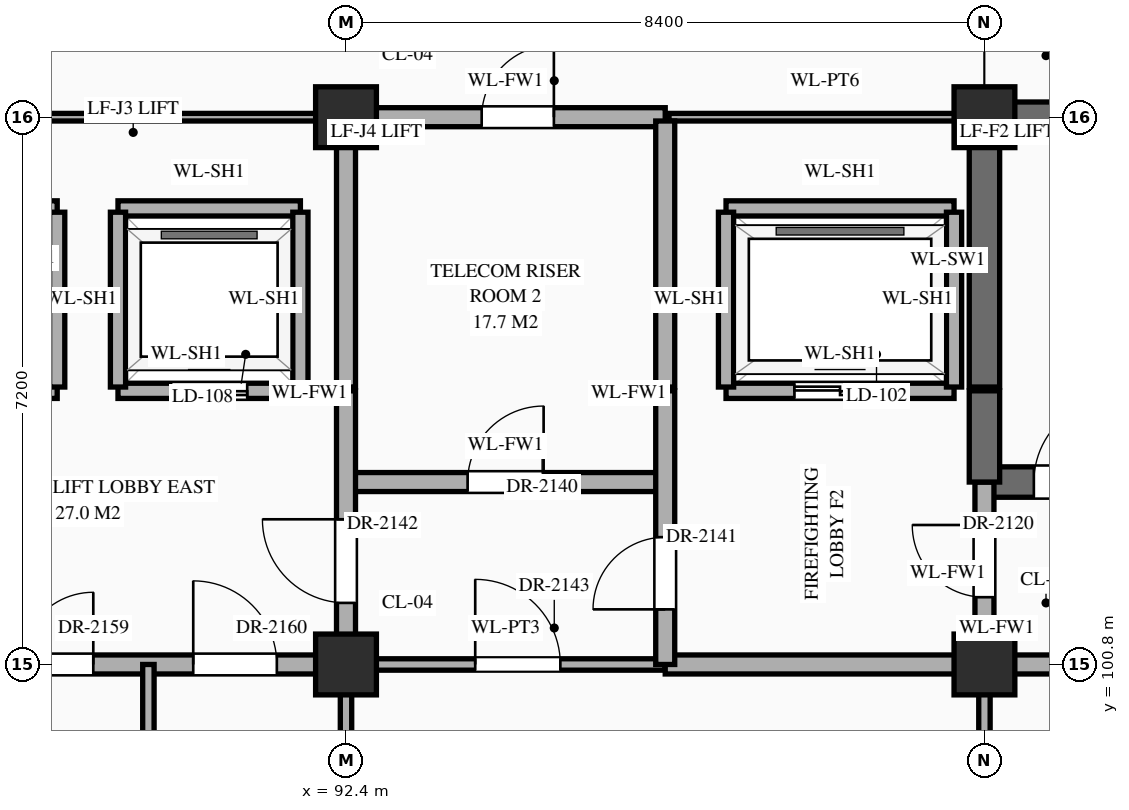
"""IFC4 building model, lengths in metres.
Left out: names, types, materials, properties, quantities, classifications, styles, units other than length and angle.
Written with IfcOpenShell. Run it as: python <this file> out.ifc"""

import sys

from ifc_helpers import new_model, si_unit, direction, frame, frame_2d, origin, origin_2d, place, context, subcontext, project, spatial, rectangle, extrude, element, fill, save


model = new_model("IFC4")
c1 = context("Model", 3, precision=1e-05, world=origin(), true_north=direction((0.0, 1.0)))
c2 = subcontext(c1, "Body", "Model", "MODEL_VIEW")
j1 = project(units=[si_unit("LENGTHUNIT", "METRE"), si_unit("PLANEANGLEUNIT", "RADIAN")], contexts=[c1])
p1 = place(None, origin())
s1 = spatial("IfcSite", under=j1, at=p1, CompositionType="ELEMENT")
p2 = place(p1, origin())
s2 = spatial("IfcBuilding", under=s1, at=p2, CompositionType="ELEMENT")
p3 = place(p2, frame((0.0, 0.0, 26.1)))
s3 = spatial("IfcBuildingStorey", under=s2, at=p3, CompositionType="ELEMENT", Elevation=26.1)
for number, where, z_axis, x_axis in (
    (1, (92.4, 100.8, 0.0), (0.0, 0.0, 1.0), (1.0, 0.0, 0.0)),
    (2, (92.4, 108.0, 0.0), (0.0, 0.0, 1.0), (1.0, 0.0, 0.0)),
    (3, (100.8, 100.8, 0.0), (0.0, 0.0, 1.0), (1.0, 0.0, 0.0)),
    (4, (100.8, 108.0, 0.0), (0.0, 0.0, 1.0), (1.0, 0.0, 0.0)),
):
    element("IfcColumn", number, at=place(p3, frame(where, z_axis=z_axis, x_axis=x_axis)), inside=s3, PredefinedType="COLUMN", context=c2, shape_type="SweptSolid", body=[
        extrude(rectangle(XDim=0.8, YDim=0.8, at=origin_2d()), origin(), (0.0, 0.0, 1.0), 4.5),
    ])
p4 = place(p3, frame((75.6, 100.8, 0.0), z_axis=(0.0, 0.0, 1.0), x_axis=(1.0, 0.0, 0.0)))
e5 = element("IfcWall", 5, at=p4, inside=s3, PredefinedType="STANDARD", context=c2, shape_type="SweptSolid", body=[
    extrude(rectangle(XDim=16.8, YDim=0.25, at=frame_2d((8.4, 0.0))), origin(), (0.0, 0.0, 1.0), 3.39),
])
p5 = place(p4, frame((3.725, 0.0, 0.0)))
e6 = element("IfcOpeningElement", 6, at=p5, cuts=e5, PredefinedType="OPENING", context=c2, shape_type="SweptSolid", body=[
    extrude(rectangle(XDim=0.95, YDim=2.15, at=frame_2d((0.475, 1.075))), frame((0.0, 0.137, 0.0), z_axis=(0.0, -1.0, 0.0), x_axis=(1.0, 0.0, 0.0)), (0.0, 0.0, 1.0), 0.274),
])
p6 = place(p4, frame((9.76, 0.0, 0.0)))
e7 = element("IfcOpeningElement", 7, at=p6, cuts=e5, PredefinedType="OPENING", context=c2, shape_type="SweptSolid", body=[
    extrude(rectangle(XDim=1.0, YDim=2.2, at=frame_2d((0.5, 1.1))), frame((0.0, 0.137, 0.0), z_axis=(0.0, -1.0, 0.0), x_axis=(1.0, 0.0, 0.0)), (0.0, 0.0, 1.0), 0.274),
])
p7 = place(p4, frame((12.525, 0.0, 0.0)))
e8 = element("IfcOpeningElement", 8, at=p7, cuts=e5, PredefinedType="OPENING", context=c2, shape_type="SweptSolid", body=[
    extrude(rectangle(XDim=0.95, YDim=2.15, at=frame_2d((0.475, 1.075))), frame((0.0, 0.137, 0.0), z_axis=(0.0, -1.0, 0.0), x_axis=(1.0, 0.0, 0.0)), (0.0, 0.0, 1.0), 0.274),
])
p8 = place(p4, frame((14.79, 0.0, 0.0)))
e9 = element("IfcOpeningElement", 9, at=p8, cuts=e5, PredefinedType="OPENING", context=c2, shape_type="SweptSolid", body=[
    extrude(rectangle(XDim=1.1, YDim=2.2, at=frame_2d((0.55, 1.1))), frame((0.0, 0.137, 0.0), z_axis=(0.0, -1.0, 0.0), x_axis=(1.0, 0.0, 0.0)), (0.0, 0.0, 1.0), 0.274),
])
p9 = place(p3, frame((92.4, 100.8, 0.0), z_axis=(0.0, 0.0, 1.0), x_axis=(1.0, 0.0, 0.0)))
e10 = element("IfcWall", 10, at=p9, inside=s3, PredefinedType="STANDARD", context=c2, shape_type="SweptSolid", body=[
    extrude(rectangle(XDim=4.2, YDim=0.15, at=frame_2d((2.1, 0.0))), origin(), (0.0, 0.0, 1.0), 3.39),
])
p10 = place(p9, frame((1.7, 0.0, 0.0)))
e11 = element("IfcOpeningElement", 11, at=p10, cuts=e10, PredefinedType="OPENING", context=c2, shape_type="SweptSolid", body=[
    extrude(rectangle(XDim=1.12, YDim=2.25, at=frame_2d((0.56, 1.125))), frame((0.0, 0.087, 0.0), z_axis=(0.0, -1.0, 0.0), x_axis=(1.0, 0.0, 0.0)), (0.0, 0.0, 1.0), 0.174),
])
p11 = place(p3, frame((96.6, 100.8, 0.0), z_axis=(0.0, 0.0, 1.0), x_axis=(1.0, 0.0, 0.0)))
e12 = element("IfcWall", 12, at=p11, inside=s3, PredefinedType="STANDARD", context=c2, shape_type="SweptSolid", body=[
    extrude(rectangle(XDim=12.6, YDim=0.25, at=frame_2d((6.3, 0.0))), origin(), (0.0, 0.0, 1.0), 3.39),
])
p12 = place(p11, frame((7.9, 0.0, 0.0)))
e13 = element("IfcOpeningElement", 13, at=p12, cuts=e12, PredefinedType="OPENING", context=c2, shape_type="SweptSolid", body=[
    extrude(rectangle(XDim=1.0, YDim=2.2, at=frame_2d((0.5, 1.1))), frame((0.0, 0.137, 0.0), z_axis=(0.0, -1.0, 0.0), x_axis=(1.0, 0.0, 0.0)), (0.0, 0.0, 1.0), 0.274),
])
p13 = place(p3, frame((92.4, 103.2, 0.0), z_axis=(0.0, 0.0, 1.0), x_axis=(1.0, 0.0, 0.0)))
e14 = element("IfcWall", 14, at=p13, inside=s3, PredefinedType="STANDARD", context=c2, shape_type="SweptSolid", body=[
    extrude(rectangle(XDim=4.2, YDim=0.25, at=frame_2d((2.1, 0.0))), origin(), (0.0, 0.0, 1.0), 4.24),
])
p14 = place(p13, frame((1.6, 0.0, 0.0)))
e15 = element("IfcOpeningElement", 15, at=p14, cuts=e14, PredefinedType="OPENING", context=c2, shape_type="SweptSolid", body=[
    extrude(rectangle(XDim=1.0, YDim=2.2, at=frame_2d((0.5, 1.1))), frame((0.0, 0.137, 0.0), z_axis=(0.0, -1.0, 0.0), x_axis=(1.0, 0.0, 0.0)), (0.0, 0.0, 1.0), 0.274),
])
p15 = place(p3, frame((100.8, 103.2, 0.0), z_axis=(0.0, 0.0, 1.0), x_axis=(1.0, 0.0, 0.0)))
e16 = element("IfcWall", 16, at=p15, inside=s3, PredefinedType="SHEAR", context=c2, shape_type="SweptSolid", body=[
    extrude(rectangle(XDim=8.4, YDim=0.4, at=frame_2d((4.2, 0.0))), origin(), (0.0, 0.0, 1.0), 4.24),
])
p16 = place(p15, frame((0.65, 0.0, 0.0)))
e17 = element("IfcOpeningElement", 17, at=p16, cuts=e16, PredefinedType="OPENING", context=c2, shape_type="SweptSolid", body=[
    extrude(rectangle(XDim=1.1, YDim=2.2, at=frame_2d((0.55, 1.1))), frame((0.0, 0.212, 0.0), z_axis=(0.0, -1.0, 0.0), x_axis=(1.0, 0.0, 0.0)), (0.0, 0.0, 1.0), 0.424),
])
p17 = place(p3, frame((86.2, 104.4, 0.0), z_axis=(0.0, 0.0, 1.0), x_axis=(1.0, 0.0, 0.0)))
e18 = element("IfcWall", 18, at=p17, inside=s3, PredefinedType="STANDARD", context=c2, shape_type="SweptSolid", body=[
    extrude(rectangle(XDim=2.4, YDim=0.2, at=frame_2d((1.2, 0.0))), origin(), (0.0, 0.0, 1.0), 4.24),
])
p18 = place(p17, frame((0.7, 0.0, 0.0)))
e19 = element("IfcOpeningElement", 19, at=p18, cuts=e18, PredefinedType="OPENING", context=c2, shape_type="SweptSolid", body=[
    extrude(rectangle(XDim=1.0, YDim=2.15, at=frame_2d((0.5, 1.075))), frame((0.0, 0.112, 0.0), z_axis=(0.0, -1.0, 0.0), x_axis=(1.0, 0.0, 0.0)), (0.0, 0.0, 1.0), 0.224),
])
p19 = place(p3, frame((89.4, 104.4, 0.0), z_axis=(0.0, 0.0, 1.0), x_axis=(1.0, 0.0, 0.0)))
e20 = element("IfcWall", 20, at=p19, inside=s3, PredefinedType="STANDARD", context=c2, shape_type="SweptSolid", body=[
    extrude(rectangle(XDim=2.4, YDim=0.2, at=frame_2d((1.2, 0.0))), origin(), (0.0, 0.0, 1.0), 4.24),
])
p20 = place(p19, frame((0.7, 0.0, 0.0)))
e21 = element("IfcOpeningElement", 21, at=p20, cuts=e20, PredefinedType="OPENING", context=c2, shape_type="SweptSolid", body=[
    extrude(rectangle(XDim=1.0, YDim=2.15, at=frame_2d((0.5, 1.075))), frame((0.0, 0.112, 0.0), z_axis=(0.0, -1.0, 0.0), x_axis=(1.0, 0.0, 0.0)), (0.0, 0.0, 1.0), 0.224),
])
p21 = place(p3, frame((97.4, 104.4, 0.0), z_axis=(0.0, 0.0, 1.0), x_axis=(1.0, 0.0, 0.0)))
e22 = element("IfcWall", 22, at=p21, inside=s3, PredefinedType="STANDARD", context=c2, shape_type="SweptSolid", body=[
    extrude(rectangle(XDim=3.0, YDim=0.2, at=frame_2d((1.5, 0.0))), origin(), (0.0, 0.0, 1.0), 4.24),
])
p22 = place(p21, frame((0.9, 0.0, 0.0)))
e23 = element("IfcOpeningElement", 23, at=p22, cuts=e22, PredefinedType="OPENING", context=c2, shape_type="SweptSolid", body=[
    extrude(rectangle(XDim=1.2, YDim=2.15, at=frame_2d((0.6, 1.075))), frame((0.0, 0.112, 0.0), z_axis=(0.0, -1.0, 0.0), x_axis=(1.0, 0.0, 0.0)), (0.0, 0.0, 1.0), 0.224),
])
for number, where, z_axis, x_axis in (
    (24, (86.2, 106.8, 0.0), (0.0, 0.0, 1.0), (1.0, 0.0, 0.0)),
    (25, (89.4, 106.8, 0.0), (0.0, 0.0, 1.0), (1.0, 0.0, 0.0)),
):
    element("IfcWall", number, at=place(p3, frame(where, z_axis=z_axis, x_axis=x_axis)), inside=s3, PredefinedType="STANDARD", context=c2, shape_type="SweptSolid", body=[
        extrude(rectangle(XDim=2.4, YDim=0.2, at=frame_2d((1.2, 0.0))), origin(), (0.0, 0.0, 1.0), 4.24),
    ])
p23 = place(p3, frame((97.4, 106.8, 0.0), z_axis=(0.0, 0.0, 1.0), x_axis=(1.0, 0.0, 0.0)))
e26 = element("IfcWall", 26, at=p23, inside=s3, PredefinedType="STANDARD", context=c2, shape_type="SweptSolid", body=[
    extrude(rectangle(XDim=3.0, YDim=0.2, at=frame_2d((1.5, 0.0))), origin(), (0.0, 0.0, 1.0), 4.24),
])
p24 = place(p3, frame((86.2, 108.0, 0.0), z_axis=(0.0, 0.0, 1.0), x_axis=(1.0, 0.0, 0.0)))
e27 = element("IfcWall", 27, at=p24, inside=s3, PredefinedType="STANDARD", context=c2, shape_type="SweptSolid", body=[
    extrude(rectangle(XDim=6.15, YDim=0.1, at=frame_2d((3.075, 0.0))), origin(), (0.0, 0.0, 1.0), 3.39),
])
p25 = place(p3, frame((92.4, 108.0, 0.0), z_axis=(0.0, 0.0, 1.0), x_axis=(1.0, 0.0, 0.0)))
e28 = element("IfcWall", 28, at=p25, inside=s3, PredefinedType="STANDARD", context=c2, shape_type="SweptSolid", body=[
    extrude(rectangle(XDim=4.2, YDim=0.25, at=frame_2d((2.1, 0.0))), origin(), (0.0, 0.0, 1.0), 3.39),
])
p26 = place(p25, frame((1.785, 0.0, 0.0)))
e29 = element("IfcOpeningElement", 29, at=p26, cuts=e28, PredefinedType="OPENING", context=c2, shape_type="SweptSolid", body=[
    extrude(rectangle(XDim=0.95, YDim=2.15, at=frame_2d((0.475, 1.075))), frame((0.0, 0.137, 0.0), z_axis=(0.0, -1.0, 0.0), x_axis=(1.0, 0.0, 0.0)), (0.0, 0.0, 1.0), 0.274),
])
p27 = place(p3, frame((96.65, 108.0, 0.0), z_axis=(0.0, 0.0, 1.0), x_axis=(1.0, 0.0, 0.0)))
e30 = element("IfcWall", 30, at=p27, inside=s3, PredefinedType="STANDARD", context=c2, shape_type="SweptSolid", body=[
    extrude(rectangle(XDim=4.1, YDim=0.1, at=frame_2d((2.05, 0.0))), origin(), (0.0, 0.0, 1.0), 3.39),
])
p28 = place(p3, frame((100.8, 108.0, 0.0), z_axis=(0.0, 0.0, 1.0), x_axis=(1.0, 0.0, 0.0)))
e31 = element("IfcWall", 31, at=p28, inside=s3, PredefinedType="SHEAR", context=c2, shape_type="SweptSolid", body=[
    extrude(rectangle(XDim=8.4, YDim=0.4, at=frame_2d((4.2, 0.0))), origin(), (0.0, 0.0, 1.0), 4.24),
])
for number, where, z_axis, x_axis in (
    (32, (88.6, 104.45, 0.0), (0.0, 0.0, 1.0), (0.0, 1.0, 0.0)),
    (33, (89.4, 104.45, 0.0), (0.0, 0.0, 1.0), (0.0, 1.0, 0.0)),
):
    element("IfcWall", number, at=place(p3, frame(where, z_axis=z_axis, x_axis=x_axis)), inside=s3, PredefinedType="STANDARD", context=c2, shape_type="SweptSolid", body=[
        extrude(rectangle(XDim=2.3, YDim=0.2, at=frame_2d((1.15, 0.0))), origin(), (0.0, 0.0, 1.0), 4.24),
    ])
p29 = place(p3, frame((89.8, 96.0, 0.0), z_axis=(0.0, 0.0, 1.0), x_axis=(0.0, 1.0, 0.0)))
e34 = element("IfcWall", 34, at=p29, inside=s3, PredefinedType="STANDARD", context=c2, shape_type="SweptSolid", body=[
    extrude(rectangle(XDim=4.8, YDim=0.15, at=frame_2d((2.4, 0.0))), origin(), (0.0, 0.0, 1.0), 4.24),
])
p30 = place(p29, frame((1.86, 0.0, 0.0)))
e35 = element("IfcOpeningElement", 35, at=p30, cuts=e34, PredefinedType="OPENING", context=c2, shape_type="SweptSolid", body=[
    extrude(rectangle(XDim=1.08, YDim=2.25, at=frame_2d((0.54, 1.125))), frame((0.0, 0.087, 0.0), z_axis=(0.0, -1.0, 0.0), x_axis=(1.0, 0.0, 0.0)), (0.0, 0.0, 1.0), 0.174),
])
p31 = place(p3, frame((91.8, 104.45, 0.0), z_axis=(0.0, 0.0, 1.0), x_axis=(0.0, 1.0, 0.0)))
e36 = element("IfcWall", 36, at=p31, inside=s3, PredefinedType="STANDARD", context=c2, shape_type="SweptSolid", body=[
    extrude(rectangle(XDim=2.3, YDim=0.2, at=frame_2d((1.15, 0.0))), origin(), (0.0, 0.0, 1.0), 4.24),
])
p32 = place(p3, frame((92.4, 96.0, 0.0), z_axis=(0.0, 0.0, 1.0), x_axis=(0.0, 1.0, 0.0)))
e37 = element("IfcWall", 37, at=p32, inside=s3, PredefinedType="STANDARD", context=c2, shape_type="SweptSolid", body=[
    extrude(rectangle(XDim=4.8, YDim=0.15, at=frame_2d((2.4, 0.0))), origin(), (0.0, 0.0, 1.0), 3.49),
])
p33 = place(p3, frame((92.4, 100.8, 0.0), z_axis=(0.0, 0.0, 1.0), x_axis=(0.0, 1.0, 0.0)))
e38 = element("IfcWall", 38, at=p33, inside=s3, PredefinedType="STANDARD", context=c2, shape_type="SweptSolid", body=[
    extrude(rectangle(XDim=3.6, YDim=0.25, at=frame_2d((1.8, 0.0))), origin(), (0.0, 0.0, 1.0), 3.49),
])
p34 = place(p33, frame((0.81, 0.0, 0.0)))
e39 = element("IfcOpeningElement", 39, at=p34, cuts=e38, PredefinedType="OPENING", context=c2, shape_type="SweptSolid", body=[
    extrude(rectangle(XDim=1.1, YDim=2.2, at=frame_2d((0.55, 1.1))), frame((0.0, 0.137, 0.0), z_axis=(0.0, -1.0, 0.0), x_axis=(1.0, 0.0, 0.0)), (0.0, 0.0, 1.0), 0.274),
])
p35 = place(p3, frame((92.4, 104.45, 0.0), z_axis=(0.0, 0.0, 1.0), x_axis=(0.0, 1.0, 0.0)))
e40 = element("IfcWall", 40, at=p35, inside=s3, PredefinedType="STANDARD", context=c2, shape_type="SweptSolid", body=[
    extrude(rectangle(XDim=3.5, YDim=0.25, at=frame_2d((1.75, 0.0))), origin(), (0.0, 0.0, 1.0), 3.49),
])
p36 = place(p3, frame((96.6, 100.8, 0.0), z_axis=(0.0, 0.0, 1.0), x_axis=(0.0, 1.0, 0.0)))
e41 = element("IfcWall", 41, at=p36, inside=s3, PredefinedType="STANDARD", context=c2, shape_type="SweptSolid", body=[
    extrude(rectangle(XDim=3.6, YDim=0.25, at=frame_2d((1.8, 0.0))), origin(), (0.0, 0.0, 1.0), 3.89),
])
p37 = place(p36, frame((0.725, 0.0, 0.0)))
e42 = element("IfcOpeningElement", 42, at=p37, cuts=e41, PredefinedType="OPENING", context=c2, shape_type="SweptSolid", body=[
    extrude(rectangle(XDim=0.95, YDim=2.15, at=frame_2d((0.475, 1.075))), frame((0.0, 0.137, 0.0), z_axis=(0.0, -1.0, 0.0), x_axis=(1.0, 0.0, 0.0)), (0.0, 0.0, 1.0), 0.274),
])
p38 = place(p3, frame((96.6, 104.45, 0.0), z_axis=(0.0, 0.0, 1.0), x_axis=(0.0, 1.0, 0.0)))
e43 = element("IfcWall", 43, at=p38, inside=s3, PredefinedType="STANDARD", context=c2, shape_type="SweptSolid", body=[
    extrude(rectangle(XDim=3.5, YDim=0.25, at=frame_2d((1.75, 0.0))), origin(), (0.0, 0.0, 1.0), 3.89),
])
for number, where, z_axis, x_axis in (
    (44, (97.4, 104.45, 0.0), (0.0, 0.0, 1.0), (0.0, 1.0, 0.0)),
    (45, (100.4, 104.45, 0.0), (0.0, 0.0, 1.0), (0.0, 1.0, 0.0)),
):
    element("IfcWall", number, at=place(p3, frame(where, z_axis=z_axis, x_axis=x_axis)), inside=s3, PredefinedType="STANDARD", context=c2, shape_type="SweptSolid", body=[
        extrude(rectangle(XDim=2.3, YDim=0.2, at=frame_2d((1.15, 0.0))), origin(), (0.0, 0.0, 1.0), 4.24),
    ])
p39 = place(p3, frame((100.8, 96.0, 0.0), z_axis=(0.0, 0.0, 1.0), x_axis=(0.0, 1.0, 0.0)))
e46 = element("IfcWall", 46, at=p39, inside=s3, PredefinedType="STANDARD", context=c2, shape_type="SweptSolid", body=[
    extrude(rectangle(XDim=4.8, YDim=0.15, at=frame_2d((2.4, 0.0))), origin(), (0.0, 0.0, 1.0), 3.49),
])
p40 = place(p3, frame((100.8, 100.8, 0.0), z_axis=(0.0, 0.0, 1.0), x_axis=(0.0, 1.0, 0.0)))
e47 = element("IfcWall", 47, at=p40, inside=s3, PredefinedType="STANDARD", context=c2, shape_type="SweptSolid", body=[
    extrude(rectangle(XDim=2.4, YDim=0.25, at=frame_2d((1.2, 0.0))), origin(), (0.0, 0.0, 1.0), 3.49),
])
p41 = place(p40, frame((0.885, 0.0, 0.0)))
e48 = element("IfcOpeningElement", 48, at=p41, cuts=e47, PredefinedType="OPENING", context=c2, shape_type="SweptSolid", body=[
    extrude(rectangle(XDim=0.95, YDim=2.15, at=frame_2d((0.475, 1.075))), frame((0.0, 0.137, 0.0), z_axis=(0.0, -1.0, 0.0), x_axis=(1.0, 0.0, 0.0)), (0.0, 0.0, 1.0), 0.274),
])
p42 = place(p3, frame((100.8, 103.2, 0.0), z_axis=(0.0, 0.0, 1.0), x_axis=(0.0, 1.0, 0.0)))
e49 = element("IfcWall", 49, at=p42, inside=s3, PredefinedType="SHEAR", context=c2, shape_type="SweptSolid", body=[
    extrude(rectangle(XDim=1.2, YDim=0.4, at=frame_2d((0.6, 0.0))), origin(), (0.0, 0.0, 1.0), 4.24),
])
p43 = place(p3, frame((100.8, 104.45, 0.0), z_axis=(0.0, 0.0, 1.0), x_axis=(0.0, 1.0, 0.0)))
e50 = element("IfcWall", 50, at=p43, inside=s3, PredefinedType="SHEAR", context=c2, shape_type="SweptSolid", body=[
    extrude(rectangle(XDim=3.5, YDim=0.4, at=frame_2d((1.75, 0.0))), origin(), (0.0, 0.0, 1.0), 4.24),
])
p44 = place(p22, origin())
e51 = element("IfcDoor", 51, at=p44, inside=s3, OperationType="DOUBLE_DOOR_SLIDING", PredefinedType="DOOR", context=c2, shape_type="SweptSolid", body=[
    extrude(rectangle(XDim=1.2, YDim=2.15, at=frame_2d((0.6, 1.075))), frame((0.0, 0.025, 0.0), z_axis=(0.0, -1.0, 0.0), x_axis=(1.0, 0.0, 0.0)), (0.0, 0.0, 1.0), 0.05),
])
fill(e23, e51)
p45 = place(p20, origin())
e52 = element("IfcDoor", 52, at=p45, inside=s3, OperationType="DOUBLE_DOOR_SLIDING", PredefinedType="DOOR", context=c2, shape_type="SweptSolid", body=[
    extrude(rectangle(XDim=1.0, YDim=2.15, at=frame_2d((0.5, 1.075))), frame((0.0, 0.025, 0.0), z_axis=(0.0, -1.0, 0.0), x_axis=(1.0, 0.0, 0.0)), (0.0, 0.0, 1.0), 0.05),
])
fill(e21, e52)
p46 = place(p16, origin())
e53 = element("IfcDoor", 53, at=p46, inside=s3, OperationType="SINGLE_SWING_RIGHT", PredefinedType="DOOR", context=c2, shape_type="SweptSolid", body=[
    extrude(rectangle(XDim=1.1, YDim=2.2, at=frame_2d((0.55, 1.1))), frame((0.0, 0.025, 0.0), z_axis=(0.0, -1.0, 0.0), x_axis=(1.0, 0.0, 0.0)), (0.0, 0.0, 1.0), 0.05),
])
fill(e17, e53)
p47 = place(p41, origin())
e54 = element("IfcDoor", 54, at=p47, inside=s3, OperationType="SINGLE_SWING_RIGHT", PredefinedType="DOOR", context=c2, shape_type="SweptSolid", body=[
    extrude(rectangle(XDim=0.95, YDim=2.15, at=frame_2d((0.475, 1.075))), frame((0.0, 0.025, 0.0), z_axis=(0.0, -1.0, 0.0), x_axis=(1.0, 0.0, 0.0)), (0.0, 0.0, 1.0), 0.05),
])
fill(e48, e54)
p48 = place(p14, origin())
e55 = element("IfcDoor", 55, at=p48, inside=s3, OperationType="SINGLE_SWING_RIGHT", PredefinedType="DOOR", context=c2, shape_type="SweptSolid", body=[
    extrude(rectangle(XDim=1.0, YDim=2.2, at=frame_2d((0.5, 1.1))), frame((0.0, 0.025, 0.0), z_axis=(0.0, -1.0, 0.0), x_axis=(1.0, 0.0, 0.0)), (0.0, 0.0, 1.0), 0.05),
])
fill(e15, e55)
p49 = place(p37, origin())
e56 = element("IfcDoor", 56, at=p49, inside=s3, OperationType="SINGLE_SWING_LEFT", PredefinedType="DOOR", context=c2, shape_type="SweptSolid", body=[
    extrude(rectangle(XDim=0.95, YDim=2.15, at=frame_2d((0.475, 1.075))), frame((0.0, 0.025, 0.0), z_axis=(0.0, -1.0, 0.0), x_axis=(1.0, 0.0, 0.0)), (0.0, 0.0, 1.0), 0.05),
])
fill(e42, e56)
p50 = place(p34, origin())
e57 = element("IfcDoor", 57, at=p50, inside=s3, OperationType="SINGLE_SWING_RIGHT", PredefinedType="DOOR", context=c2, shape_type="SweptSolid", body=[
    extrude(rectangle(XDim=1.1, YDim=2.2, at=frame_2d((0.55, 1.1))), frame((0.0, 0.025, 0.0), z_axis=(0.0, -1.0, 0.0), x_axis=(1.0, 0.0, 0.0)), (0.0, 0.0, 1.0), 0.05),
])
fill(e39, e57)
p51 = place(p10, origin())
e58 = element("IfcDoor", 58, at=p51, inside=s3, OperationType="SINGLE_SWING_LEFT", PredefinedType="DOOR", context=c2, shape_type="SweptSolid", body=[
    extrude(rectangle(XDim=1.12, YDim=2.25, at=frame_2d((0.56, 1.125))), frame((0.0, 0.025, 0.0), z_axis=(0.0, -1.0, 0.0), x_axis=(1.0, 0.0, 0.0)), (0.0, 0.0, 1.0), 0.05),
])
fill(e11, e58)
p52 = place(p26, origin())
e59 = element("IfcDoor", 59, at=p52, inside=s3, OperationType="SINGLE_SWING_RIGHT", PredefinedType="DOOR", context=c2, shape_type="SweptSolid", body=[
    extrude(rectangle(XDim=0.95, YDim=2.15, at=frame_2d((0.475, 1.075))), frame((0.0, 0.025, 0.0), z_axis=(0.0, -1.0, 0.0), x_axis=(1.0, 0.0, 0.0)), (0.0, 0.0, 1.0), 0.05),
])
fill(e29, e59)
p53 = place(p7, origin())
e60 = element("IfcDoor", 60, at=p53, inside=s3, OperationType="SINGLE_SWING_RIGHT", PredefinedType="DOOR", context=c2, shape_type="SweptSolid", body=[
    extrude(rectangle(XDim=0.95, YDim=2.15, at=frame_2d((0.475, 1.075))), frame((0.0, 0.025, 0.0), z_axis=(0.0, -1.0, 0.0), x_axis=(1.0, 0.0, 0.0)), (0.0, 0.0, 1.0), 0.05),
])
fill(e8, e60)
p54 = place(p8, origin())
e61 = element("IfcDoor", 61, at=p54, inside=s3, OperationType="SINGLE_SWING_LEFT", PredefinedType="DOOR", context=c2, shape_type="SweptSolid", body=[
    extrude(rectangle(XDim=1.1, YDim=2.2, at=frame_2d((0.55, 1.1))), frame((0.0, 0.025, 0.0), z_axis=(0.0, -1.0, 0.0), x_axis=(1.0, 0.0, 0.0)), (0.0, 0.0, 1.0), 0.05),
])
fill(e9, e61)
save(model, sys.argv[1])
